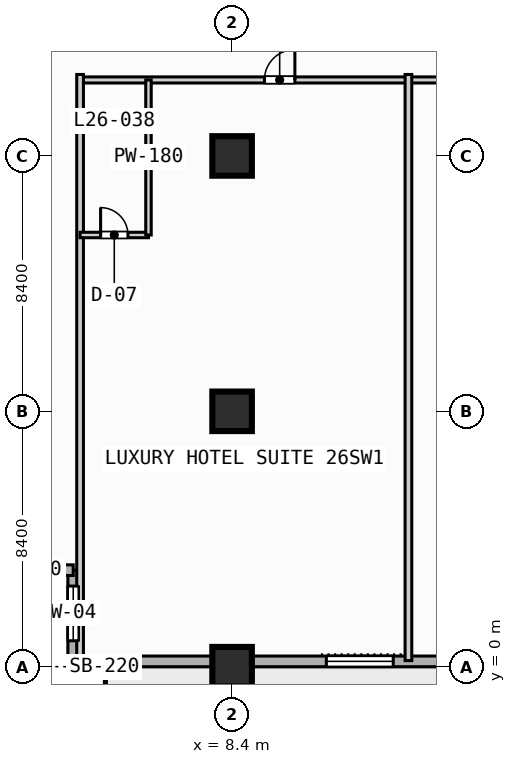
"""IFC4 building model, lengths in metres.
Left out: names, types, materials, properties, quantities, classifications, styles, units other than length and angle.
Written with IfcOpenShell. Run it as: python <this file> out.ifc"""

import sys

from ifc_helpers import new_model, si_unit, direction, frame, frame_2d, origin, origin_2d, place, context, subcontext, project, spatial, rectangle, extrude, element, fill, save


model = new_model("IFC4")
c1 = context("Model", 3, precision=1e-05, world=origin(), true_north=direction((0.0, 1.0)))
c2 = subcontext(c1, "Body", "Model", "MODEL_VIEW")
j1 = project(units=[si_unit("LENGTHUNIT", "METRE"), si_unit("PLANEANGLEUNIT", "RADIAN")], contexts=[c1])
p1 = place(None, origin())
s1 = spatial("IfcSite", under=j1, at=p1, CompositionType="ELEMENT")
p2 = place(p1, origin())
s2 = spatial("IfcBuilding", under=s1, at=p2, CompositionType="ELEMENT")
p3 = place(p2, frame((0.0, 0.0, 111.4)))
s3 = spatial("IfcBuildingStorey", under=s2, at=p3, CompositionType="ELEMENT", Elevation=111.4)
for number, where, z_axis, x_axis in (
    (1, (8.4, 0.0, 0.0), (0.0, 0.0, 1.0), (1.0, 0.0, 0.0)),
    (2, (8.4, 8.4, 0.0), (0.0, 0.0, 1.0), (1.0, 0.0, 0.0)),
    (3, (8.4, 16.8, 0.0), (0.0, 0.0, 1.0), (1.0, 0.0, 0.0)),
):
    element("IfcColumn", number, at=place(p3, frame(where, z_axis=z_axis, x_axis=x_axis)), inside=s3, PredefinedType="COLUMN", context=c2, shape_type="SweptSolid", body=[
        extrude(rectangle(XDim=1.3, YDim=1.3, at=origin_2d()), origin(), (0.0, 0.0, 1.0), 3.8),
    ])
p4 = place(p3, frame((3.175, 0.175, 0.0), z_axis=(0.0, 0.0, 1.0), x_axis=(0.0, 1.0, 0.0)))
e4 = element("IfcWall", 4, at=p4, inside=s3, PredefinedType="STANDARD", context=c2, shape_type="SweptSolid", body=[
    extrude(rectangle(XDim=3.0, YDim=0.35, at=frame_2d((1.5, 0.0))), origin(), (0.0, 0.0, 1.0), 3.55),
])
p5 = place(p4, frame((0.677, 0.0, 0.85)))
e5 = element("IfcOpeningElement", 5, at=p5, cuts=e4, PredefinedType="OPENING", context=c2, shape_type="SweptSolid", body=[
    extrude(rectangle(XDim=1.8, YDim=1.8, at=frame_2d((0.9, 0.9))), frame((0.0, 0.185, 0.0), z_axis=(0.0, -1.0, 0.0), x_axis=(1.0, 0.0, 0.0)), (0.0, 0.0, 1.0), 0.37),
])
p6 = place(p3, frame((3.175, 3.175, 0.0), z_axis=(0.0, 0.0, 1.0), x_axis=(-1.0, 0.0, 0.0)))
e6 = element("IfcWall", 6, at=p6, inside=s3, PredefinedType="STANDARD", context=c2, shape_type="SweptSolid", body=[
    extrude(rectangle(XDim=3.0, YDim=0.35, at=frame_2d((1.5, 0.0))), origin(), (0.0, 0.0, 1.0), 3.55),
])
p7 = place(p3, frame((72.425, 0.175, 0.0), z_axis=(0.0, 0.0, 1.0), x_axis=(-1.0, 0.0, 0.0)))
e7 = element("IfcWall", 7, at=p7, inside=s3, PredefinedType="STANDARD", context=c2, shape_type="SweptSolid", body=[
    extrude(rectangle(XDim=69.25, YDim=0.35, at=frame_2d((34.625, 0.0))), origin(), (0.0, 0.0, 1.0), 3.55),
])
p8 = place(p7, frame((50.725, 0.0, 0.0)))
e8 = element("IfcOpeningElement", 8, at=p8, cuts=e7, PredefinedType="OPENING", context=c2, shape_type="SweptSolid", body=[
    extrude(rectangle(XDim=1.4, YDim=2.2, at=frame_2d((0.7, 1.1))), frame((0.0, 0.185, 0.0), z_axis=(0.0, -1.0, 0.0), x_axis=(1.0, 0.0, 0.0)), (0.0, 0.0, 1.0), 0.37),
])
p9 = place(p7, frame((58.725, 0.0, 0.85)))
e9 = element("IfcOpeningElement", 9, at=p9, cuts=e7, PredefinedType="OPENING", context=c2, shape_type="SweptSolid", body=[
    extrude(rectangle(XDim=2.2, YDim=1.8, at=frame_2d((1.1, 0.9))), frame((0.0, 0.185, 0.0), z_axis=(0.0, -1.0, 0.0), x_axis=(1.0, 0.0, 0.0)), (0.0, 0.0, 1.0), 0.37),
])
p10 = place(p7, frame((41.925, 0.0, 0.85)))
e10 = element("IfcOpeningElement", 10, at=p10, cuts=e7, PredefinedType="OPENING", context=c2, shape_type="SweptSolid", body=[
    extrude(rectangle(XDim=2.2, YDim=1.8, at=frame_2d((1.1, 0.9))), frame((0.0, 0.185, 0.0), z_axis=(0.0, -1.0, 0.0), x_axis=(1.0, 0.0, 0.0)), (0.0, 0.0, 1.0), 0.37),
])
p11 = place(p7, frame((33.525, 0.0, 0.85)))
e11 = element("IfcOpeningElement", 11, at=p11, cuts=e7, PredefinedType="OPENING", context=c2, shape_type="SweptSolid", body=[
    extrude(rectangle(XDim=2.2, YDim=1.8, at=frame_2d((1.1, 0.9))), frame((0.0, 0.185, 0.0), z_axis=(0.0, -1.0, 0.0), x_axis=(1.0, 0.0, 0.0)), (0.0, 0.0, 1.0), 0.37),
])
p12 = place(p7, frame((25.125, 0.0, 0.85)))
e12 = element("IfcOpeningElement", 12, at=p12, cuts=e7, PredefinedType="OPENING", context=c2, shape_type="SweptSolid", body=[
    extrude(rectangle(XDim=2.2, YDim=1.8, at=frame_2d((1.1, 0.9))), frame((0.0, 0.185, 0.0), z_axis=(0.0, -1.0, 0.0), x_axis=(1.0, 0.0, 0.0)), (0.0, 0.0, 1.0), 0.37),
])
p13 = place(p7, frame((8.325, 0.0, 0.85)))
e13 = element("IfcOpeningElement", 13, at=p13, cuts=e7, PredefinedType="OPENING", context=c2, shape_type="SweptSolid", body=[
    extrude(rectangle(XDim=2.2, YDim=1.8, at=frame_2d((1.1, 0.9))), frame((0.0, 0.185, 0.0), z_axis=(0.0, -1.0, 0.0), x_axis=(1.0, 0.0, 0.0)), (0.0, 0.0, 1.0), 0.37),
])
p14 = place(p7, frame((2.125, 0.0, 0.85)))
e14 = element("IfcOpeningElement", 14, at=p14, cuts=e7, PredefinedType="OPENING", context=c2, shape_type="SweptSolid", body=[
    extrude(rectangle(XDim=1.8, YDim=1.8, at=frame_2d((0.9, 0.9))), frame((0.0, 0.185, 0.0), z_axis=(0.0, -1.0, 0.0), x_axis=(1.0, 0.0, 0.0)), (0.0, 0.0, 1.0), 0.37),
])
p15 = place(p3, frame((3.4, 19.3, 0.0), z_axis=(0.0, 0.0, 1.0), x_axis=(1.0, 0.0, 0.0)))
e15 = element("IfcWall", 15, at=p15, inside=s3, PredefinedType="PARTITIONING", context=c2, shape_type="SweptSolid", body=[
    extrude(rectangle(XDim=35.8, YDim=0.2, at=frame_2d((17.9, 0.0))), origin(), (0.0, 0.0, 1.0), 3.55),
])
p16 = place(p15, frame((6.065, 0.0, 0.0)))
e16 = element("IfcOpeningElement", 16, at=p16, cuts=e15, PredefinedType="OPENING", context=c2, shape_type="SweptSolid", body=[
    extrude(rectangle(XDim=1.0, YDim=2.15, at=frame_2d((0.5, 1.075))), frame((0.0, 0.11, 0.0), z_axis=(0.0, -1.0, 0.0), x_axis=(1.0, 0.0, 0.0)), (0.0, 0.0, 1.0), 0.22),
])
p17 = place(p15, frame((13.735, 0.0, 0.0)))
e17 = element("IfcOpeningElement", 17, at=p17, cuts=e15, PredefinedType="OPENING", context=c2, shape_type="SweptSolid", body=[
    extrude(rectangle(XDim=1.0, YDim=2.15, at=frame_2d((0.5, 1.075))), frame((0.0, 0.11, 0.0), z_axis=(0.0, -1.0, 0.0), x_axis=(1.0, 0.0, 0.0)), (0.0, 0.0, 1.0), 0.22),
])
p18 = place(p15, frame((22.96, 0.0, 0.0)))
e18 = element("IfcOpeningElement", 18, at=p18, cuts=e15, PredefinedType="OPENING", context=c2, shape_type="SweptSolid", body=[
    extrude(rectangle(XDim=1.0, YDim=2.15, at=frame_2d((0.5, 1.075))), frame((0.0, 0.11, 0.0), z_axis=(0.0, -1.0, 0.0), x_axis=(1.0, 0.0, 0.0)), (0.0, 0.0, 1.0), 0.22),
])
p19 = place(p15, frame((30.86, 0.0, 0.0)))
e19 = element("IfcOpeningElement", 19, at=p19, cuts=e15, PredefinedType="OPENING", context=c2, shape_type="SweptSolid", body=[
    extrude(rectangle(XDim=1.0, YDim=2.15, at=frame_2d((0.5, 1.075))), frame((0.0, 0.11, 0.0), z_axis=(0.0, -1.0, 0.0), x_axis=(1.0, 0.0, 0.0)), (0.0, 0.0, 1.0), 0.22),
])
p20 = place(p3, frame((3.4, 0.2, 0.0), z_axis=(0.0, 0.0, 1.0), x_axis=(0.0, 1.0, 0.0)))
e20 = element("IfcWall", 20, at=p20, inside=s3, PredefinedType="PARTITIONING", context=c2, shape_type="SweptSolid", body=[
    extrude(rectangle(XDim=19.28, YDim=0.22, at=frame_2d((9.64, 0.0))), origin(), (0.0, 0.0, 1.0), 3.55),
])
p21 = place(p3, frame((3.4, 14.2, 0.0), z_axis=(0.0, 0.0, 1.0), x_axis=(1.0, 0.0, 0.0)))
e21 = element("IfcWall", 21, at=p21, inside=s3, PredefinedType="PLUMBINGWALL", context=c2, shape_type="SweptSolid", body=[
    extrude(rectangle(XDim=2.25, YDim=0.18, at=frame_2d((1.125, 0.0))), origin(), (0.0, 0.0, 1.0), 3.55),
])
p22 = place(p21, frame((0.675, 0.0, 0.0)))
e22 = element("IfcOpeningElement", 22, at=p22, cuts=e21, PredefinedType="OPENING", context=c2, shape_type="SweptSolid", body=[
    extrude(rectangle(XDim=0.9, YDim=2.1, at=frame_2d((0.45, 1.05))), frame((0.0, 0.1, 0.0), z_axis=(0.0, -1.0, 0.0), x_axis=(1.0, 0.0, 0.0)), (0.0, 0.0, 1.0), 0.2),
])
p23 = place(p3, frame((5.65, 14.2, 0.0), z_axis=(0.0, 0.0, 1.0), x_axis=(0.0, 1.0, 0.0)))
e23 = element("IfcWall", 23, at=p23, inside=s3, PredefinedType="PLUMBINGWALL", context=c2, shape_type="SweptSolid", body=[
    extrude(rectangle(XDim=5.1, YDim=0.18, at=frame_2d((2.55, 0.0))), origin(), (0.0, 0.0, 1.0), 3.55),
])
p24 = place(p3, frame((14.2, 0.2, 0.0), z_axis=(0.0, 0.0, 1.0), x_axis=(0.0, 1.0, 0.0)))
e24 = element("IfcWall", 24, at=p24, inside=s3, PredefinedType="PARTITIONING", context=c2, shape_type="SweptSolid", body=[
    extrude(rectangle(XDim=19.28, YDim=0.22, at=frame_2d((9.64, 0.0))), origin(), (0.0, 0.0, 1.0), 3.55),
])
p25 = place(p5, origin())
e25 = element("IfcWindow", 25, at=p25, inside=s3, PartitioningType="SINGLE_PANEL", PredefinedType="WINDOW", context=c2, shape_type="SweptSolid", body=[
    extrude(rectangle(XDim=1.8, YDim=1.8, at=frame_2d((0.9, 0.9))), frame((0.0, 0.03, 0.0), z_axis=(0.0, -1.0, 0.0), x_axis=(1.0, 0.0, 0.0)), (0.0, 0.0, 1.0), 0.06),
])
fill(e5, e25)
p26 = place(p9, origin())
e26 = element("IfcWindow", 26, at=p26, inside=s3, PartitioningType="SINGLE_PANEL", PredefinedType="WINDOW", context=c2, shape_type="SweptSolid", body=[
    extrude(rectangle(XDim=2.2, YDim=1.8, at=frame_2d((1.1, 0.9))), frame((0.0, 0.03, 0.0), z_axis=(0.0, -1.0, 0.0), x_axis=(1.0, 0.0, 0.0)), (0.0, 0.0, 1.0), 0.06),
])
fill(e9, e26)
p27 = place(p16, origin())
e27 = element("IfcDoor", 27, at=p27, inside=s3, OperationType="SINGLE_SWING_RIGHT", PredefinedType="DOOR", context=c2, shape_type="SweptSolid", body=[
    extrude(rectangle(XDim=1.0, YDim=2.15, at=frame_2d((0.5, 1.075))), frame((0.0, 0.025, 0.0), z_axis=(0.0, -1.0, 0.0), x_axis=(1.0, 0.0, 0.0)), (0.0, 0.0, 1.0), 0.05),
])
fill(e16, e27)
p28 = place(p22, origin())
e28 = element("IfcDoor", 28, at=p28, inside=s3, OperationType="SINGLE_SWING_LEFT", PredefinedType="DOOR", context=c2, shape_type="SweptSolid", body=[
    extrude(rectangle(XDim=0.9, YDim=2.1, at=frame_2d((0.45, 1.05))), frame((0.0, 0.025, 0.0), z_axis=(0.0, -1.0, 0.0), x_axis=(1.0, 0.0, 0.0)), (0.0, 0.0, 1.0), 0.05),
])
fill(e22, e28)
save(model, sys.argv[1])
